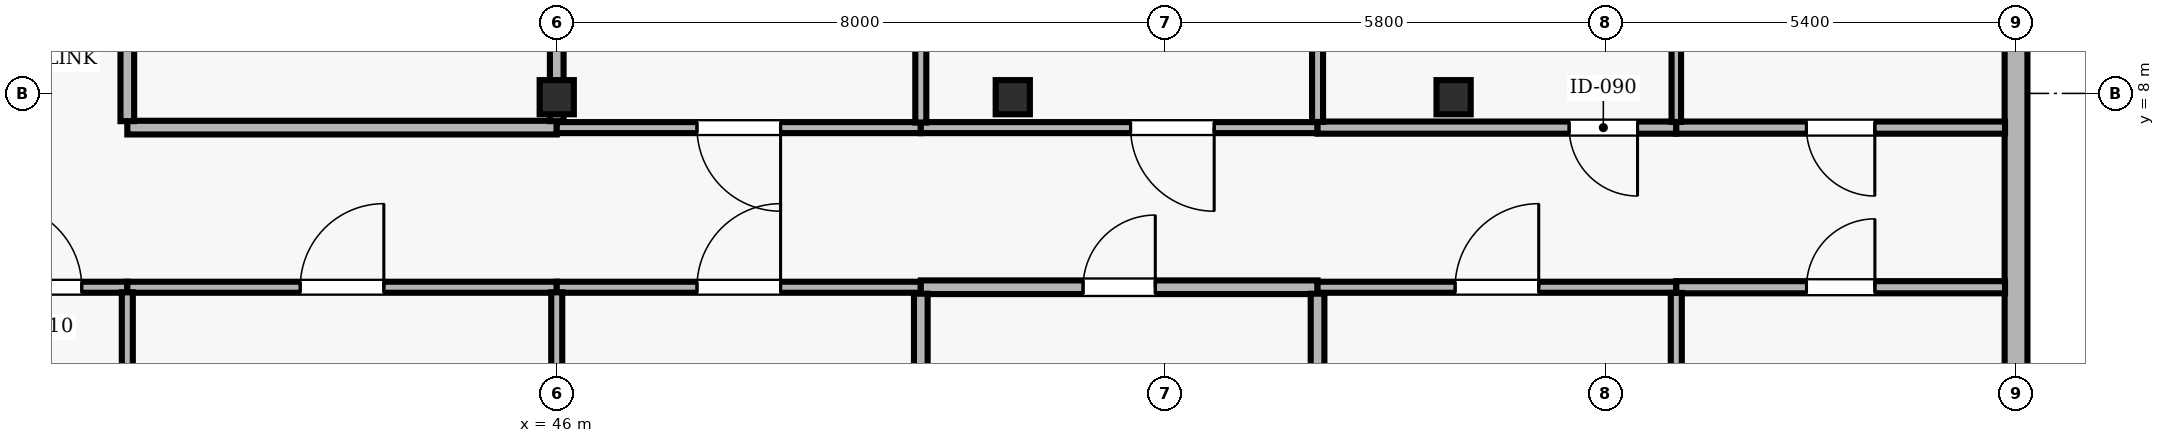
"""IFC4 building model, lengths in metres.
Left out: names, types, materials, properties, quantities, classifications, styles, units other than length and angle.
Written with IfcOpenShell. Run it as: python <this file> out.ifc"""

import sys

from ifc_helpers import new_model, si_unit, direction, frame, frame_2d, origin, origin_2d, place, context, subcontext, project, spatial, rectangle, hollow_rectangle, extrude, element, fill, save


model = new_model("IFC4")
c1 = context("Model", 3, precision=1e-05, world=origin(), true_north=direction((0.0, 1.0)))
c2 = subcontext(c1, "Body", "Model", "MODEL_VIEW")
j1 = project(units=[si_unit("LENGTHUNIT", "METRE"), si_unit("PLANEANGLEUNIT", "RADIAN")], contexts=[c1])
p1 = place(None, origin())
s1 = spatial("IfcSite", under=j1, at=p1, CompositionType="ELEMENT")
p2 = place(p1, origin())
s2 = spatial("IfcBuilding", under=s1, at=p2, CompositionType="ELEMENT")
p3 = place(p2, frame((0.0, 0.0, 210.9)))
s3 = spatial("IfcBuildingStorey", under=s2, at=p3, CompositionType="ELEMENT", Elevation=210.9)
for number, where, z_axis, x_axis in (
    (1, (46.0, 7.95, 0.0), (0.0, 0.0, 1.0), (1.0, 0.0, 0.0)),
    (2, (52.0, 7.95, 0.0), (0.0, 0.0, 1.0), (1.0, 0.0, 0.0)),
    (3, (57.8, 7.95, 0.0), (0.0, 0.0, 1.0), (1.0, 0.0, 0.0)),
):
    element("IfcColumn", number, at=place(p3, frame(where, z_axis=z_axis, x_axis=x_axis)), inside=s3, PredefinedType="COLUMN", context=c2, shape_type="SweptSolid", body=[
        extrude(hollow_rectangle(XDim=0.45, YDim=0.45, WallThickness=0.02, at=origin_2d()), origin(), (0.0, 0.0, 1.0), 3.9),
    ])
p4 = place(p3, frame((65.2, 2.5, 0.0), z_axis=(0.0, 0.0, 1.0), x_axis=(0.0, 1.0, 0.0)))
e4 = element("IfcWall", 4, at=p4, inside=s3, PredefinedType="SOLIDWALL", context=c2, shape_type="SweptSolid", body=[
    extrude(rectangle(XDim=11.0, YDim=0.3, at=frame_2d((5.5, 0.0))), origin(), (0.0, 0.0, 1.0), 3.69),
])
p5 = place(p4, frame((7.5, 0.0, 0.9)))
e5 = element("IfcOpeningElement", 5, at=p5, cuts=e4, PredefinedType="OPENING", context=c2, shape_type="SweptSolid", body=[
    extrude(rectangle(XDim=1.5, YDim=1.8, at=frame_2d((0.75, 0.9))), frame((0.0, 0.16, 0.0), z_axis=(0.0, -1.0, 0.0), x_axis=(1.0, 0.0, 0.0)), (0.0, 0.0, 1.0), 0.32),
])
p6 = place(p3, frame((38.05, 5.45, 0.0), z_axis=(0.0, 0.0, 1.0), x_axis=(1.0, 0.0, 0.0)))
e6 = element("IfcWall", 6, at=p6, inside=s3, PredefinedType="PARTITIONING", context=c2, shape_type="SweptSolid", body=[
    extrude(rectangle(XDim=2.3, YDim=0.145, at=frame_2d((1.15, 0.0))), origin(), (0.0, 0.0, 1.0), 3.372),
])
p7 = place(p6, frame((0.6, 0.0, 0.0)))
e7 = element("IfcOpeningElement", 7, at=p7, cuts=e6, PredefinedType="OPENING", context=c2, shape_type="SweptSolid", body=[
    extrude(rectangle(XDim=1.1, YDim=2.15, at=frame_2d((0.55, 1.075))), frame((0.0, 0.083, 0.0), z_axis=(0.0, -1.0, 0.0), x_axis=(1.0, 0.0, 0.0)), (0.0, 0.0, 1.0), 0.165),
])
p8 = place(p3, frame((40.35, 5.45, 0.0), z_axis=(0.0, 0.0, 1.0), x_axis=(1.0, 0.0, 0.0)))
e8 = element("IfcWall", 8, at=p8, inside=s3, PredefinedType="PARTITIONING", context=c2, shape_type="SweptSolid", body=[
    extrude(rectangle(XDim=5.65, YDim=0.145, at=frame_2d((2.825, 0.0))), origin(), (0.0, 0.0, 1.0), 3.372),
])
p9 = place(p8, frame((2.275, 0.0, 0.0)))
e9 = element("IfcOpeningElement", 9, at=p9, cuts=e8, PredefinedType="OPENING", context=c2, shape_type="SweptSolid", body=[
    extrude(rectangle(XDim=1.1, YDim=2.15, at=frame_2d((0.55, 1.075))), frame((0.0, 0.083, 0.0), z_axis=(0.0, -1.0, 0.0), x_axis=(1.0, 0.0, 0.0)), (0.0, 0.0, 1.0), 0.165),
])
p10 = place(p3, frame((46.0, 5.45, 0.0), z_axis=(0.0, 0.0, 1.0), x_axis=(1.0, 0.0, 0.0)))
e10 = element("IfcWall", 10, at=p10, inside=s3, PredefinedType="PARTITIONING", context=c2, shape_type="SweptSolid", body=[
    extrude(rectangle(XDim=4.79, YDim=0.145, at=frame_2d((2.395, 0.0))), origin(), (0.0, 0.0, 1.0), 3.372),
])
p11 = place(p10, frame((1.845, 0.0, 0.0)))
e11 = element("IfcOpeningElement", 11, at=p11, cuts=e10, PredefinedType="OPENING", context=c2, shape_type="SweptSolid", body=[
    extrude(rectangle(XDim=1.1, YDim=2.15, at=frame_2d((0.55, 1.075))), frame((0.0, 0.083, 0.0), z_axis=(0.0, -1.0, 0.0), x_axis=(1.0, 0.0, 0.0)), (0.0, 0.0, 1.0), 0.165),
])
p12 = place(p3, frame((46.0, 7.55, 0.0), z_axis=(0.0, 0.0, 1.0), x_axis=(-1.0, 0.0, 0.0)))
e12 = element("IfcWall", 12, at=p12, inside=s3, PredefinedType="PARTITIONING", context=c2, shape_type="SweptSolid", body=[
    extrude(rectangle(XDim=5.65, YDim=0.18, at=frame_2d((2.825, 0.0))), origin(), (0.0, 0.0, 1.0), 3.146),
])
p13 = place(p3, frame((50.79, 5.45, 0.0), z_axis=(0.0, 0.0, 1.0), x_axis=(1.0, 0.0, 0.0)))
e13 = element("IfcWall", 13, at=p13, inside=s3, PredefinedType="PARTITIONING", context=c2, shape_type="SweptSolid", body=[
    extrude(rectangle(XDim=5.22, YDim=0.18, at=frame_2d((2.61, 0.0))), origin(), (0.0, 0.0, 1.0), 3.372),
])
p14 = place(p13, frame((2.135, 0.0, 0.0)))
e14 = element("IfcOpeningElement", 14, at=p14, cuts=e13, PredefinedType="OPENING", context=c2, shape_type="SweptSolid", body=[
    extrude(rectangle(XDim=0.95, YDim=2.1, at=frame_2d((0.475, 1.05))), frame((0.0, 0.1, 0.0), z_axis=(0.0, -1.0, 0.0), x_axis=(1.0, 0.0, 0.0)), (0.0, 0.0, 1.0), 0.2),
])
p15 = place(p3, frame((50.79, 7.55, 0.0), z_axis=(0.0, 0.0, 1.0), x_axis=(-1.0, 0.0, 0.0)))
e15 = element("IfcWall", 15, at=p15, inside=s3, PredefinedType="PARTITIONING", context=c2, shape_type="SweptSolid", body=[
    extrude(rectangle(XDim=4.79, YDim=0.145, at=frame_2d((2.395, 0.0))), origin(), (0.0, 0.0, 1.0), 3.146),
])
p16 = place(p15, frame((1.845, 0.0, 0.0)))
e16 = element("IfcOpeningElement", 16, at=p16, cuts=e15, PredefinedType="OPENING", context=c2, shape_type="SweptSolid", body=[
    extrude(rectangle(XDim=1.1, YDim=2.15, at=frame_2d((0.55, 1.075))), frame((0.0, 0.083, 0.0), z_axis=(0.0, -1.0, 0.0), x_axis=(1.0, 0.0, 0.0)), (0.0, 0.0, 1.0), 0.165),
])
p17 = place(p3, frame((56.01, 5.45, 0.0), z_axis=(0.0, 0.0, 1.0), x_axis=(1.0, 0.0, 0.0)))
e17 = element("IfcWall", 17, at=p17, inside=s3, PredefinedType="PARTITIONING", context=c2, shape_type="SweptSolid", body=[
    extrude(rectangle(XDim=4.72, YDim=0.145, at=frame_2d((2.36, 0.0))), origin(), (0.0, 0.0, 1.0), 3.372),
])
p18 = place(p17, frame((1.81, 0.0, 0.0)))
e18 = element("IfcOpeningElement", 18, at=p18, cuts=e17, PredefinedType="OPENING", context=c2, shape_type="SweptSolid", body=[
    extrude(rectangle(XDim=1.1, YDim=2.15, at=frame_2d((0.55, 1.075))), frame((0.0, 0.083, 0.0), z_axis=(0.0, -1.0, 0.0), x_axis=(1.0, 0.0, 0.0)), (0.0, 0.0, 1.0), 0.165),
])
p19 = place(p3, frame((56.01, 7.55, 0.0), z_axis=(0.0, 0.0, 1.0), x_axis=(-1.0, 0.0, 0.0)))
e19 = element("IfcWall", 19, at=p19, inside=s3, PredefinedType="PARTITIONING", context=c2, shape_type="SweptSolid", body=[
    extrude(rectangle(XDim=5.22, YDim=0.145, at=frame_2d((2.61, 0.0))), origin(), (0.0, 0.0, 1.0), 3.146),
])
p20 = place(p19, frame((1.36, 0.0, 0.0)))
e20 = element("IfcOpeningElement", 20, at=p20, cuts=e19, PredefinedType="OPENING", context=c2, shape_type="SweptSolid", body=[
    extrude(rectangle(XDim=1.1, YDim=2.15, at=frame_2d((0.55, 1.075))), frame((0.0, 0.083, 0.0), z_axis=(0.0, -1.0, 0.0), x_axis=(1.0, 0.0, 0.0)), (0.0, 0.0, 1.0), 0.165),
])
p21 = place(p3, frame((60.73, 5.45, 0.0), z_axis=(0.0, 0.0, 1.0), x_axis=(1.0, 0.0, 0.0)))
e21 = element("IfcWall", 21, at=p21, inside=s3, PredefinedType="PARTITIONING", context=c2, shape_type="SweptSolid", body=[
    extrude(rectangle(XDim=4.325, YDim=0.16, at=frame_2d((2.163, 0.0))), origin(), (0.0, 0.0, 1.0), 3.69),
])
p22 = place(p21, frame((1.713, 0.0, 0.0)))
e22 = element("IfcOpeningElement", 22, at=p22, cuts=e21, PredefinedType="OPENING", context=c2, shape_type="SweptSolid", body=[
    extrude(rectangle(XDim=0.9, YDim=2.1, at=frame_2d((0.45, 1.05))), frame((0.0, 0.09, 0.0), z_axis=(0.0, -1.0, 0.0), x_axis=(1.0, 0.0, 0.0)), (0.0, 0.0, 1.0), 0.18),
])
p23 = place(p3, frame((60.73, 7.55, 0.0), z_axis=(0.0, 0.0, 1.0), x_axis=(-1.0, 0.0, 0.0)))
e23 = element("IfcWall", 23, at=p23, inside=s3, PredefinedType="PARTITIONING", context=c2, shape_type="SweptSolid", body=[
    extrude(rectangle(XDim=4.72, YDim=0.16, at=frame_2d((2.36, 0.0))), origin(), (0.0, 0.0, 1.0), 3.146),
])
p24 = place(p23, frame((0.51, 0.0, 0.0)))
e24 = element("IfcOpeningElement", 24, at=p24, cuts=e23, PredefinedType="OPENING", context=c2, shape_type="SweptSolid", body=[
    extrude(rectangle(XDim=0.9, YDim=2.1, at=frame_2d((0.45, 1.05))), frame((0.0, 0.09, 0.0), z_axis=(0.0, -1.0, 0.0), x_axis=(1.0, 0.0, 0.0)), (0.0, 0.0, 1.0), 0.18),
])
p25 = place(p3, frame((65.055, 7.55, 0.0), z_axis=(0.0, 0.0, 1.0), x_axis=(-1.0, 0.0, 0.0)))
e25 = element("IfcWall", 25, at=p25, inside=s3, PredefinedType="PARTITIONING", context=c2, shape_type="SweptSolid", body=[
    extrude(rectangle(XDim=4.325, YDim=0.16, at=frame_2d((2.163, 0.0))), origin(), (0.0, 0.0, 1.0), 3.69),
])
p26 = place(p25, frame((1.713, 0.0, 0.0)))
e26 = element("IfcOpeningElement", 26, at=p26, cuts=e25, PredefinedType="OPENING", context=c2, shape_type="SweptSolid", body=[
    extrude(rectangle(XDim=0.9, YDim=2.1, at=frame_2d((0.45, 1.05))), frame((0.0, 0.09, 0.0), z_axis=(0.0, -1.0, 0.0), x_axis=(1.0, 0.0, 0.0)), (0.0, 0.0, 1.0), 0.18),
])
p27 = place(p3, frame((40.35, 0.145, 0.0), z_axis=(0.0, 0.0, 1.0), x_axis=(0.0, 1.0, 0.0)))
e27 = element("IfcWall", 27, at=p27, inside=s3, PredefinedType="PARTITIONING", context=c2, shape_type="SweptSolid", body=[
    extrude(rectangle(XDim=5.238, YDim=0.145, at=frame_2d((2.619, 0.0))), origin(), (0.0, 0.0, 1.0), 3.69),
])
p28 = place(p3, frame((40.35, 7.635, 0.0), z_axis=(0.0, 0.0, 1.0), x_axis=(0.0, 1.0, 0.0)))
e28 = element("IfcWall", 28, at=p28, inside=s3, PredefinedType="PARTITIONING", context=c2, shape_type="SweptSolid", body=[
    extrude(rectangle(XDim=8.28, YDim=0.18, at=frame_2d((4.14, 0.0))), origin(), (0.0, 0.0, 1.0), 3.372),
])
p29 = place(p28, frame((3.665, 0.0, 0.0)))
e29 = element("IfcOpeningElement", 29, at=p29, cuts=e28, PredefinedType="OPENING", context=c2, shape_type="SweptSolid", body=[
    extrude(rectangle(XDim=0.95, YDim=2.1, at=frame_2d((0.475, 1.05))), frame((0.0, 0.1, 0.0), z_axis=(0.0, -1.0, 0.0), x_axis=(1.0, 0.0, 0.0)), (0.0, 0.0, 1.0), 0.2),
])
p30 = place(p3, frame((46.0, 0.145, 0.0), z_axis=(0.0, 0.0, 1.0), x_axis=(0.0, 1.0, 0.0)))
e30 = element("IfcWall", 30, at=p30, inside=s3, PredefinedType="PARTITIONING", context=c2, shape_type="SweptSolid", body=[
    extrude(rectangle(XDim=5.238, YDim=0.145, at=frame_2d((2.619, 0.0))), origin(), (0.0, 0.0, 1.0), 3.146),
])
p31 = place(p3, frame((46.0, 7.635, 0.0), z_axis=(0.0, 0.0, 1.0), x_axis=(0.0, 1.0, 0.0)))
e31 = element("IfcWall", 31, at=p31, inside=s3, PredefinedType="PARTITIONING", context=c2, shape_type="SweptSolid", body=[
    extrude(rectangle(XDim=8.22, YDim=0.18, at=frame_2d((4.11, 0.0))), origin(), (0.0, 0.0, 1.0), 3.146),
])
p32 = place(p3, frame((50.79, 0.145, 0.0), z_axis=(0.0, 0.0, 1.0), x_axis=(0.0, 1.0, 0.0)))
e32 = element("IfcWall", 32, at=p32, inside=s3, PredefinedType="PARTITIONING", context=c2, shape_type="SweptSolid", body=[
    extrude(rectangle(XDim=5.22, YDim=0.18, at=frame_2d((2.61, 0.0))), origin(), (0.0, 0.0, 1.0), 3.69),
])
p33 = place(p3, frame((50.79, 7.617, 0.0), z_axis=(0.0, 0.0, 1.0), x_axis=(0.0, 1.0, 0.0)))
e33 = element("IfcWall", 33, at=p33, inside=s3, PredefinedType="PARTITIONING", context=c2, shape_type="SweptSolid", body=[
    extrude(rectangle(XDim=8.238, YDim=0.145, at=frame_2d((4.119, 0.0))), origin(), (0.0, 0.0, 1.0), 3.69),
])
p34 = place(p3, frame((56.01, 0.145, 0.0), z_axis=(0.0, 0.0, 1.0), x_axis=(0.0, 1.0, 0.0)))
e34 = element("IfcWall", 34, at=p34, inside=s3, PredefinedType="PARTITIONING", context=c2, shape_type="SweptSolid", body=[
    extrude(rectangle(XDim=5.22, YDim=0.18, at=frame_2d((2.61, 0.0))), origin(), (0.0, 0.0, 1.0), 3.69),
])
p35 = place(p3, frame((56.01, 7.625, 0.0), z_axis=(0.0, 0.0, 1.0), x_axis=(0.0, 1.0, 0.0)))
e35 = element("IfcWall", 35, at=p35, inside=s3, PredefinedType="PARTITIONING", context=c2, shape_type="SweptSolid", body=[
    extrude(rectangle(XDim=8.23, YDim=0.145, at=frame_2d((4.115, 0.0))), origin(), (0.0, 0.0, 1.0), 3.69),
])
p36 = place(p3, frame((60.73, 0.145, 0.0), z_axis=(0.0, 0.0, 1.0), x_axis=(0.0, 1.0, 0.0)))
e36 = element("IfcWall", 36, at=p36, inside=s3, PredefinedType="PARTITIONING", context=c2, shape_type="SweptSolid", body=[
    extrude(rectangle(XDim=5.23, YDim=0.145, at=frame_2d((2.615, 0.0))), origin(), (0.0, 0.0, 1.0), 3.69),
])
p37 = place(p3, frame((60.73, 7.625, 0.0), z_axis=(0.0, 0.0, 1.0), x_axis=(0.0, 1.0, 0.0)))
e37 = element("IfcWall", 37, at=p37, inside=s3, PredefinedType="PARTITIONING", context=c2, shape_type="SweptSolid", body=[
    extrude(rectangle(XDim=8.23, YDim=0.125, at=frame_2d((4.115, 0.0))), origin(), (0.0, 0.0, 1.0), 3.69),
])
p38 = place(p7, origin())
e38 = element("IfcDoor", 38, at=p38, inside=s3, OperationType="SINGLE_SWING_LEFT", PredefinedType="DOOR", context=c2, shape_type="SweptSolid", body=[
    extrude(rectangle(XDim=1.1, YDim=2.15, at=frame_2d((0.55, 1.075))), frame((0.0, 0.025, 0.0), z_axis=(0.0, -1.0, 0.0), x_axis=(1.0, 0.0, 0.0)), (0.0, 0.0, 1.0), 0.05),
])
fill(e7, e38)
p39 = place(p9, origin())
e39 = element("IfcDoor", 39, at=p39, inside=s3, OperationType="SINGLE_SWING_RIGHT", PredefinedType="DOOR", context=c2, shape_type="SweptSolid", body=[
    extrude(rectangle(XDim=1.1, YDim=2.15, at=frame_2d((0.55, 1.075))), frame((0.0, 0.025, 0.0), z_axis=(0.0, -1.0, 0.0), x_axis=(1.0, 0.0, 0.0)), (0.0, 0.0, 1.0), 0.05),
])
fill(e9, e39)
p40 = place(p11, origin())
e40 = element("IfcDoor", 40, at=p40, inside=s3, OperationType="SINGLE_SWING_RIGHT", PredefinedType="DOOR", context=c2, shape_type="SweptSolid", body=[
    extrude(rectangle(XDim=1.1, YDim=2.15, at=frame_2d((0.55, 1.075))), frame((0.0, 0.025, 0.0), z_axis=(0.0, -1.0, 0.0), x_axis=(1.0, 0.0, 0.0)), (0.0, 0.0, 1.0), 0.05),
])
fill(e11, e40)
p41 = place(p16, origin())
e41 = element("IfcDoor", 41, at=p41, inside=s3, OperationType="SINGLE_SWING_LEFT", PredefinedType="DOOR", context=c2, shape_type="SweptSolid", body=[
    extrude(rectangle(XDim=1.1, YDim=2.15, at=frame_2d((0.55, 1.075))), frame((0.0, 0.025, 0.0), z_axis=(0.0, -1.0, 0.0), x_axis=(1.0, 0.0, 0.0)), (0.0, 0.0, 1.0), 0.05),
])
fill(e16, e41)
p42 = place(p14, origin())
e42 = element("IfcDoor", 42, at=p42, inside=s3, OperationType="SINGLE_SWING_RIGHT", PredefinedType="DOOR", context=c2, shape_type="SweptSolid", body=[
    extrude(rectangle(XDim=0.95, YDim=2.1, at=frame_2d((0.475, 1.05))), frame((0.0, 0.025, 0.0), z_axis=(0.0, -1.0, 0.0), x_axis=(1.0, 0.0, 0.0)), (0.0, 0.0, 1.0), 0.05),
])
fill(e14, e42)
p43 = place(p20, origin())
e43 = element("IfcDoor", 43, at=p43, inside=s3, OperationType="SINGLE_SWING_LEFT", PredefinedType="DOOR", context=c2, shape_type="SweptSolid", body=[
    extrude(rectangle(XDim=1.1, YDim=2.15, at=frame_2d((0.55, 1.075))), frame((0.0, 0.025, 0.0), z_axis=(0.0, -1.0, 0.0), x_axis=(1.0, 0.0, 0.0)), (0.0, 0.0, 1.0), 0.05),
])
fill(e20, e43)
p44 = place(p18, origin())
e44 = element("IfcDoor", 44, at=p44, inside=s3, OperationType="SINGLE_SWING_RIGHT", PredefinedType="DOOR", context=c2, shape_type="SweptSolid", body=[
    extrude(rectangle(XDim=1.1, YDim=2.15, at=frame_2d((0.55, 1.075))), frame((0.0, 0.025, 0.0), z_axis=(0.0, -1.0, 0.0), x_axis=(1.0, 0.0, 0.0)), (0.0, 0.0, 1.0), 0.05),
])
fill(e18, e44)
p45 = place(p24, origin())
e45 = element("IfcDoor", 45, at=p45, inside=s3, OperationType="SINGLE_SWING_LEFT", PredefinedType="DOOR", context=c2, shape_type="SweptSolid", body=[
    extrude(rectangle(XDim=0.9, YDim=2.1, at=frame_2d((0.45, 1.05))), frame((0.0, 0.025, 0.0), z_axis=(0.0, -1.0, 0.0), x_axis=(1.0, 0.0, 0.0)), (0.0, 0.0, 1.0), 0.05),
])
fill(e24, e45)
p46 = place(p22, origin())
e46 = element("IfcDoor", 46, at=p46, inside=s3, OperationType="SINGLE_SWING_RIGHT", PredefinedType="DOOR", context=c2, shape_type="SweptSolid", body=[
    extrude(rectangle(XDim=0.9, YDim=2.1, at=frame_2d((0.45, 1.05))), frame((0.0, 0.025, 0.0), z_axis=(0.0, -1.0, 0.0), x_axis=(1.0, 0.0, 0.0)), (0.0, 0.0, 1.0), 0.05),
])
fill(e22, e46)
p47 = place(p26, origin())
e47 = element("IfcDoor", 47, at=p47, inside=s3, OperationType="SINGLE_SWING_LEFT", PredefinedType="DOOR", context=c2, shape_type="SweptSolid", body=[
    extrude(rectangle(XDim=0.9, YDim=2.1, at=frame_2d((0.45, 1.05))), frame((0.0, 0.025, 0.0), z_axis=(0.0, -1.0, 0.0), x_axis=(1.0, 0.0, 0.0)), (0.0, 0.0, 1.0), 0.05),
])
fill(e26, e47)
save(model, sys.argv[1])
